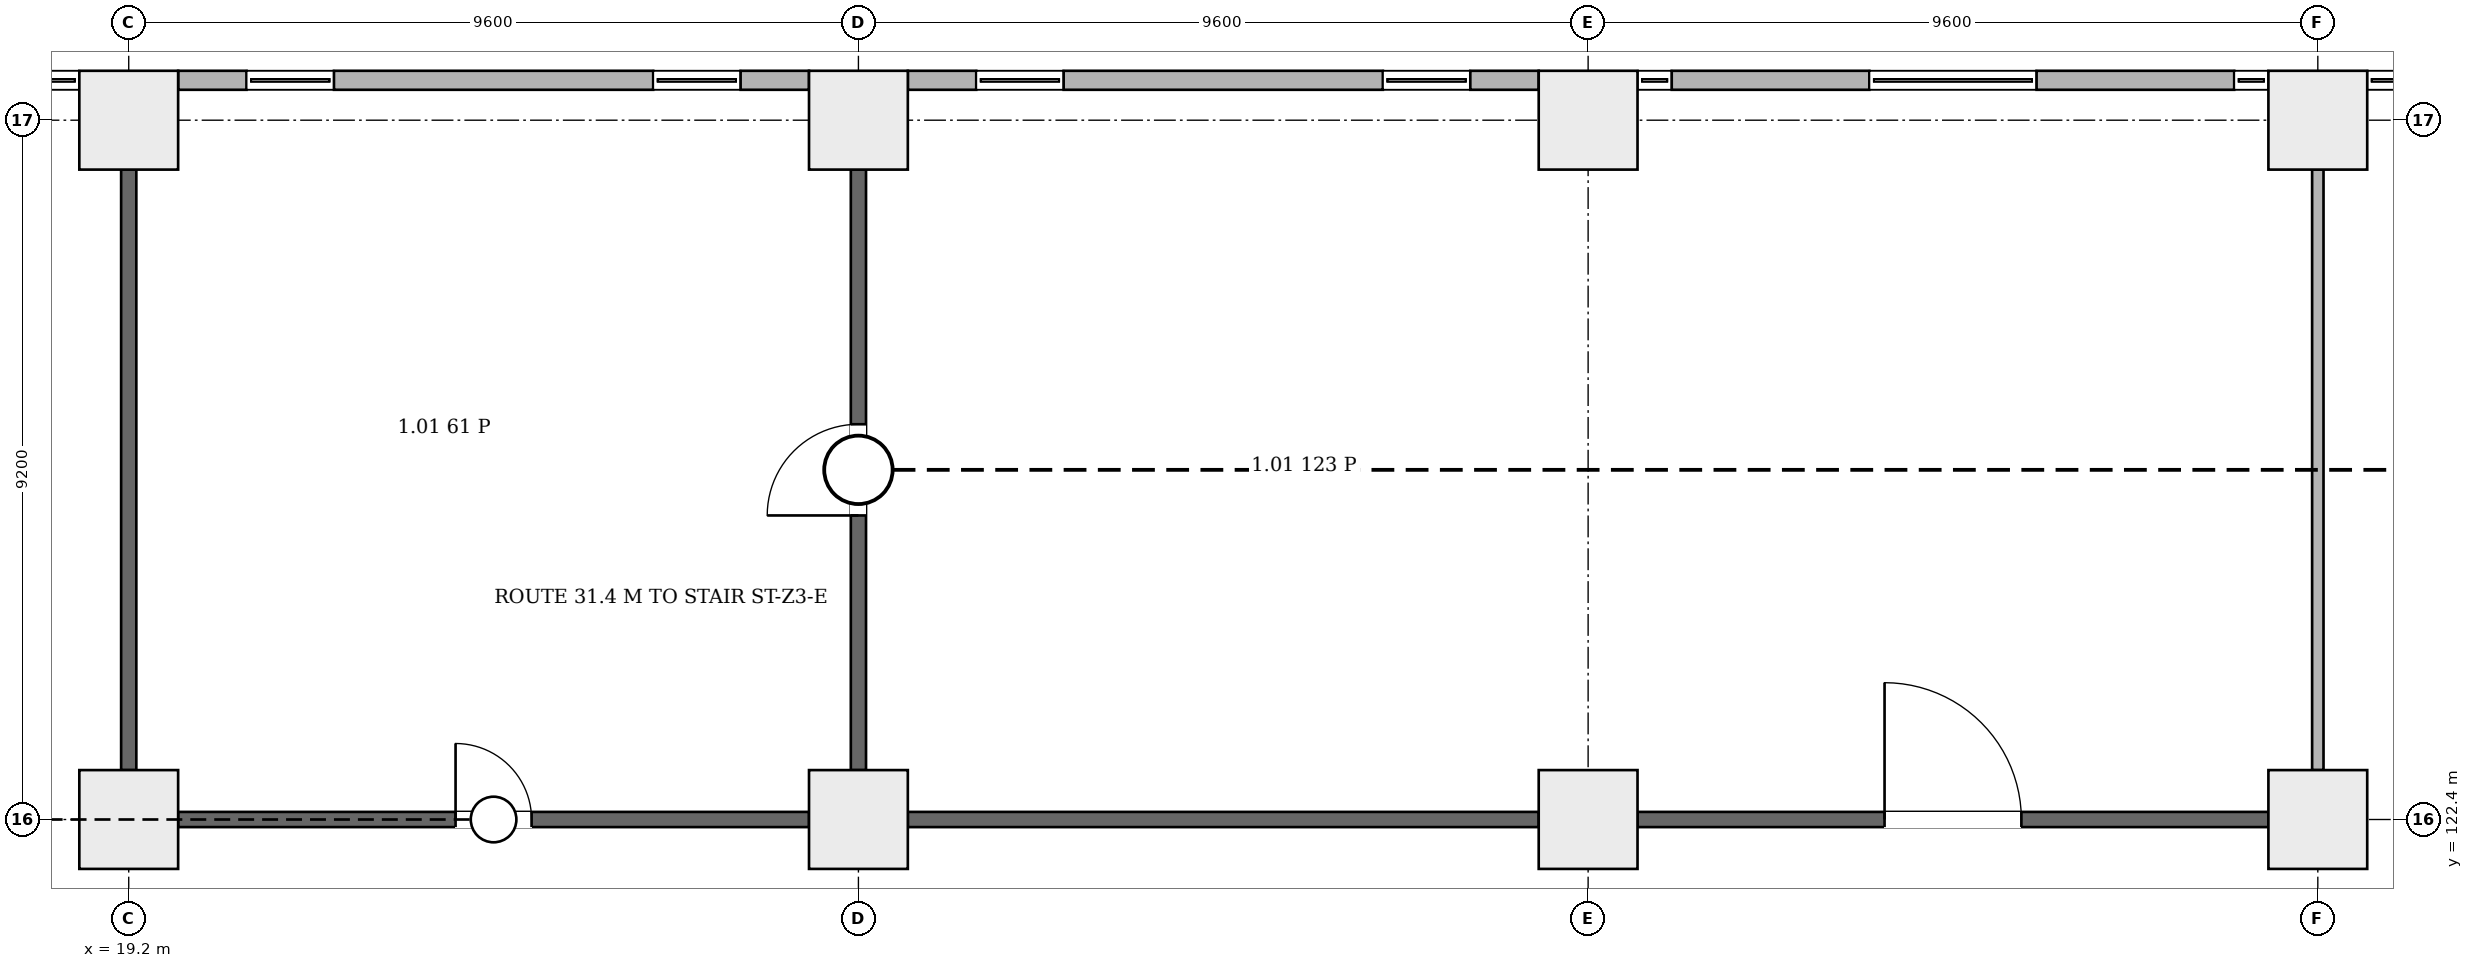
"""IFC4 building model, lengths in metres.
Left out: names, types, materials, properties, quantities, classifications, styles, units other than length and angle.
Written with IfcOpenShell. Run it as: python <this file> out.ifc"""

import sys

from ifc_helpers import new_model, si_unit, direction, frame, frame_2d, origin, origin_2d, place, context, subcontext, project, spatial, rectangle, extrude, element, fill, save


model = new_model("IFC4")
c1 = context("Model", 3, precision=1e-05, world=origin(), true_north=direction((0.0, 1.0)))
c2 = subcontext(c1, "Body", "Model", "MODEL_VIEW")
j1 = project(units=[si_unit("LENGTHUNIT", "METRE"), si_unit("PLANEANGLEUNIT", "RADIAN")], contexts=[c1])
p1 = place(None, origin())
s1 = spatial("IfcSite", under=j1, at=p1, CompositionType="ELEMENT")
p2 = place(p1, origin())
s2 = spatial("IfcBuilding", under=s1, at=p2, CompositionType="ELEMENT")
p3 = place(p2, frame((0.0, 0.0, 6.5)))
s3 = spatial("IfcBuildingStorey", under=s2, at=p3, CompositionType="ELEMENT", Elevation=6.5)
for number, where, z_axis, x_axis in (
    (1, (19.2, 122.4, 0.0), (0.0, 0.0, 1.0), (1.0, 0.0, 0.0)),
    (2, (28.8, 122.4, 0.0), (0.0, 0.0, 1.0), (1.0, 0.0, 0.0)),
    (3, (38.4, 122.4, 0.0), (0.0, 0.0, 1.0), (1.0, 0.0, 0.0)),
    (4, (48.0, 122.4, 0.0), (0.0, 0.0, 1.0), (1.0, 0.0, 0.0)),
    (5, (19.2, 131.6, 0.0), (0.0, 0.0, 1.0), (1.0, 0.0, 0.0)),
    (6, (28.8, 131.6, 0.0), (0.0, 0.0, 1.0), (1.0, 0.0, 0.0)),
    (7, (38.4, 131.6, 0.0), (0.0, 0.0, 1.0), (1.0, 0.0, 0.0)),
    (8, (48.0, 131.6, 0.0), (0.0, 0.0, 1.0), (1.0, 0.0, 0.0)),
):
    element("IfcColumn", number, at=place(p3, frame(where, z_axis=z_axis, x_axis=x_axis)), inside=s3, PredefinedType="COLUMN", context=c2, shape_type="SweptSolid", body=[
        extrude(rectangle(XDim=1.3, YDim=1.3, at=origin_2d()), origin(), (0.0, 0.0, 1.0), 7.7),
    ])
p4 = place(p3, frame((20.75, 132.125, 0.0), z_axis=(0.0, 0.0, 1.0), x_axis=(-1.0, 0.0, 0.0)))
e9 = element("IfcWall", 9, at=p4, inside=s3, PredefinedType="ELEMENTEDWALL", context=c2, shape_type="SweptSolid", body=[
    extrude(rectangle(XDim=0.9, YDim=0.25, at=frame_2d((0.45, 0.0))), origin(), (0.0, 0.0, 1.0), 7.29),
])
p5 = place(p3, frame((26.1, 132.125, 0.0), z_axis=(0.0, 0.0, 1.0), x_axis=(-1.0, 0.0, 0.0)))
e10 = element("IfcWall", 10, at=p5, inside=s3, PredefinedType="ELEMENTEDWALL", context=c2, shape_type="SweptSolid", body=[
    extrude(rectangle(XDim=4.2, YDim=0.25, at=frame_2d((2.1, 0.0))), origin(), (0.0, 0.0, 1.0), 7.29),
])
p6 = place(p3, frame((28.15, 132.125, 0.0), z_axis=(0.0, 0.0, 1.0), x_axis=(-1.0, 0.0, 0.0)))
e11 = element("IfcWall", 11, at=p6, inside=s3, PredefinedType="ELEMENTEDWALL", context=c2, shape_type="SweptSolid", body=[
    extrude(rectangle(XDim=0.9, YDim=0.25, at=frame_2d((0.45, 0.0))), origin(), (0.0, 0.0, 1.0), 7.29),
])
p7 = place(p3, frame((30.35, 132.125, 0.0), z_axis=(0.0, 0.0, 1.0), x_axis=(-1.0, 0.0, 0.0)))
e12 = element("IfcWall", 12, at=p7, inside=s3, PredefinedType="ELEMENTEDWALL", context=c2, shape_type="SweptSolid", body=[
    extrude(rectangle(XDim=0.9, YDim=0.25, at=frame_2d((0.45, 0.0))), origin(), (0.0, 0.0, 1.0), 7.29),
])
p8 = place(p3, frame((35.7, 132.125, 0.0), z_axis=(0.0, 0.0, 1.0), x_axis=(-1.0, 0.0, 0.0)))
e13 = element("IfcWall", 13, at=p8, inside=s3, PredefinedType="ELEMENTEDWALL", context=c2, shape_type="SweptSolid", body=[
    extrude(rectangle(XDim=4.2, YDim=0.25, at=frame_2d((2.1, 0.0))), origin(), (0.0, 0.0, 1.0), 7.29),
])
p9 = place(p3, frame((37.75, 132.125, 0.0), z_axis=(0.0, 0.0, 1.0), x_axis=(-1.0, 0.0, 0.0)))
e14 = element("IfcWall", 14, at=p9, inside=s3, PredefinedType="ELEMENTEDWALL", context=c2, shape_type="SweptSolid", body=[
    extrude(rectangle(XDim=0.9, YDim=0.25, at=frame_2d((0.45, 0.0))), origin(), (0.0, 0.0, 1.0), 7.29),
])
p10 = place(p3, frame((42.1, 132.125, 0.0), z_axis=(0.0, 0.0, 1.0), x_axis=(-1.0, 0.0, 0.0)))
e15 = element("IfcWall", 15, at=p10, inside=s3, PredefinedType="ELEMENTEDWALL", context=c2, shape_type="SweptSolid", body=[
    extrude(rectangle(XDim=2.6, YDim=0.25, at=frame_2d((1.3, 0.0))), origin(), (0.0, 0.0, 1.0), 7.29),
])
p11 = place(p3, frame((46.9, 132.125, 0.0), z_axis=(0.0, 0.0, 1.0), x_axis=(-1.0, 0.0, 0.0)))
e16 = element("IfcWall", 16, at=p11, inside=s3, PredefinedType="ELEMENTEDWALL", context=c2, shape_type="SweptSolid", body=[
    extrude(rectangle(XDim=2.6, YDim=0.25, at=frame_2d((1.3, 0.0))), origin(), (0.0, 0.0, 1.0), 7.29),
])
p12 = place(p3, frame((19.2, 123.05, 0.0), z_axis=(0.0, 0.0, 1.0), x_axis=(0.0, 1.0, 0.0)))
e17 = element("IfcWall", 17, at=p12, inside=s3, PredefinedType="PARTITIONING", context=c2, shape_type="SweptSolid", body=[
    extrude(rectangle(XDim=7.9, YDim=0.2, at=frame_2d((3.95, 0.0))), origin(), (0.0, 0.0, 1.0), 6.89),
])
p13 = place(p3, frame((19.85, 122.4, 0.0), z_axis=(0.0, 0.0, 1.0), x_axis=(1.0, 0.0, 0.0)))
e18 = element("IfcWall", 18, at=p13, inside=s3, PredefinedType="PARTITIONING", context=c2, shape_type="SweptSolid", body=[
    extrude(rectangle(XDim=8.3, YDim=0.2, at=frame_2d((4.15, 0.0))), origin(), (0.0, 0.0, 1.0), 6.29),
])
p14 = place(p13, frame((3.65, 0.0, 0.0)))
e19 = element("IfcOpeningElement", 19, at=p14, cuts=e18, PredefinedType="OPENING", context=c2, shape_type="SweptSolid", body=[
    extrude(rectangle(XDim=1.0, YDim=2.1, at=frame_2d((0.5, 1.05))), frame((0.0, 0.11, 0.0), z_axis=(0.0, -1.0, 0.0), x_axis=(1.0, 0.0, 0.0)), (0.0, 0.0, 1.0), 0.22),
])
p15 = place(p3, frame((28.8, 123.05, 0.0), z_axis=(0.0, 0.0, 1.0), x_axis=(0.0, 1.0, 0.0)))
e20 = element("IfcWall", 20, at=p15, inside=s3, PredefinedType="PARTITIONING", context=c2, shape_type="SweptSolid", body=[
    extrude(rectangle(XDim=7.9, YDim=0.2, at=frame_2d((3.95, 0.0))), origin(), (0.0, 0.0, 1.0), 6.89),
])
p16 = place(p15, frame((3.35, 0.0, 0.0)))
e21 = element("IfcOpeningElement", 21, at=p16, cuts=e20, PredefinedType="OPENING", context=c2, shape_type="SweptSolid", body=[
    extrude(rectangle(XDim=1.2, YDim=2.1, at=frame_2d((0.6, 1.05))), frame((0.0, 0.11, 0.0), z_axis=(0.0, -1.0, 0.0), x_axis=(1.0, 0.0, 0.0)), (0.0, 0.0, 1.0), 0.22),
])
p17 = place(p3, frame((29.45, 122.4, 0.0), z_axis=(0.0, 0.0, 1.0), x_axis=(1.0, 0.0, 0.0)))
e22 = element("IfcWall", 22, at=p17, inside=s3, PredefinedType="PARTITIONING", context=c2, shape_type="SweptSolid", body=[
    extrude(rectangle(XDim=8.3, YDim=0.2, at=frame_2d((4.15, 0.0))), origin(), (0.0, 0.0, 1.0), 6.29),
])
p18 = place(p3, frame((39.05, 122.4, 0.0), z_axis=(0.0, 0.0, 1.0), x_axis=(1.0, 0.0, 0.0)))
e23 = element("IfcWall", 23, at=p18, inside=s3, PredefinedType="PARTITIONING", context=c2, shape_type="SweptSolid", body=[
    extrude(rectangle(XDim=8.3, YDim=0.2, at=frame_2d((4.15, 0.0))), origin(), (0.0, 0.0, 1.0), 6.29),
])
p19 = place(p18, frame((3.25, 0.0, 0.0)))
e24 = element("IfcOpeningElement", 24, at=p19, cuts=e23, PredefinedType="OPENING", context=c2, shape_type="SweptSolid", body=[
    extrude(rectangle(XDim=1.8, YDim=2.1, at=frame_2d((0.9, 1.05))), frame((0.0, 0.11, 0.0), z_axis=(0.0, -1.0, 0.0), x_axis=(1.0, 0.0, 0.0)), (0.0, 0.0, 1.0), 0.22),
])
p20 = place(p3, frame((48.0, 123.05, 0.0), z_axis=(0.0, 0.0, 1.0), x_axis=(0.0, 1.0, 0.0)))
e25 = element("IfcWall", 25, at=p20, inside=s3, PredefinedType="PARTITIONING", context=c2, shape_type="SweptSolid", body=[
    extrude(rectangle(XDim=7.9, YDim=0.15, at=frame_2d((3.95, 0.0))), origin(), (0.0, 0.0, 1.0), 6.89),
])
p21 = place(p19, origin())
e26 = element("IfcDoor", 26, at=p21, inside=s3, OperationType="DOUBLE_DOOR_SINGLE_SWING", PredefinedType="DOOR", context=c2, shape_type="SweptSolid", body=[
    extrude(rectangle(XDim=1.8, YDim=2.1, at=frame_2d((0.9, 1.05))), frame((0.0, 0.025, 0.0), z_axis=(0.0, -1.0, 0.0), x_axis=(1.0, 0.0, 0.0)), (0.0, 0.0, 1.0), 0.05),
])
fill(e24, e26)
p22 = place(p16, origin())
e27 = element("IfcDoor", 27, at=p22, inside=s3, OperationType="SINGLE_SWING_LEFT", PredefinedType="DOOR", context=c2, shape_type="SweptSolid", body=[
    extrude(rectangle(XDim=1.2, YDim=2.1, at=frame_2d((0.6, 1.05))), frame((0.0, 0.025, 0.0), z_axis=(0.0, -1.0, 0.0), x_axis=(1.0, 0.0, 0.0)), (0.0, 0.0, 1.0), 0.05),
])
fill(e21, e27)
p23 = place(p14, origin())
e28 = element("IfcDoor", 28, at=p23, inside=s3, OperationType="SINGLE_SWING_LEFT", PredefinedType="DOOR", context=c2, shape_type="SweptSolid", body=[
    extrude(rectangle(XDim=1.0, YDim=2.1, at=frame_2d((0.5, 1.05))), frame((0.0, 0.025, 0.0), z_axis=(0.0, -1.0, 0.0), x_axis=(1.0, 0.0, 0.0)), (0.0, 0.0, 1.0), 0.05),
])
fill(e19, e28)
save(model, sys.argv[1])
